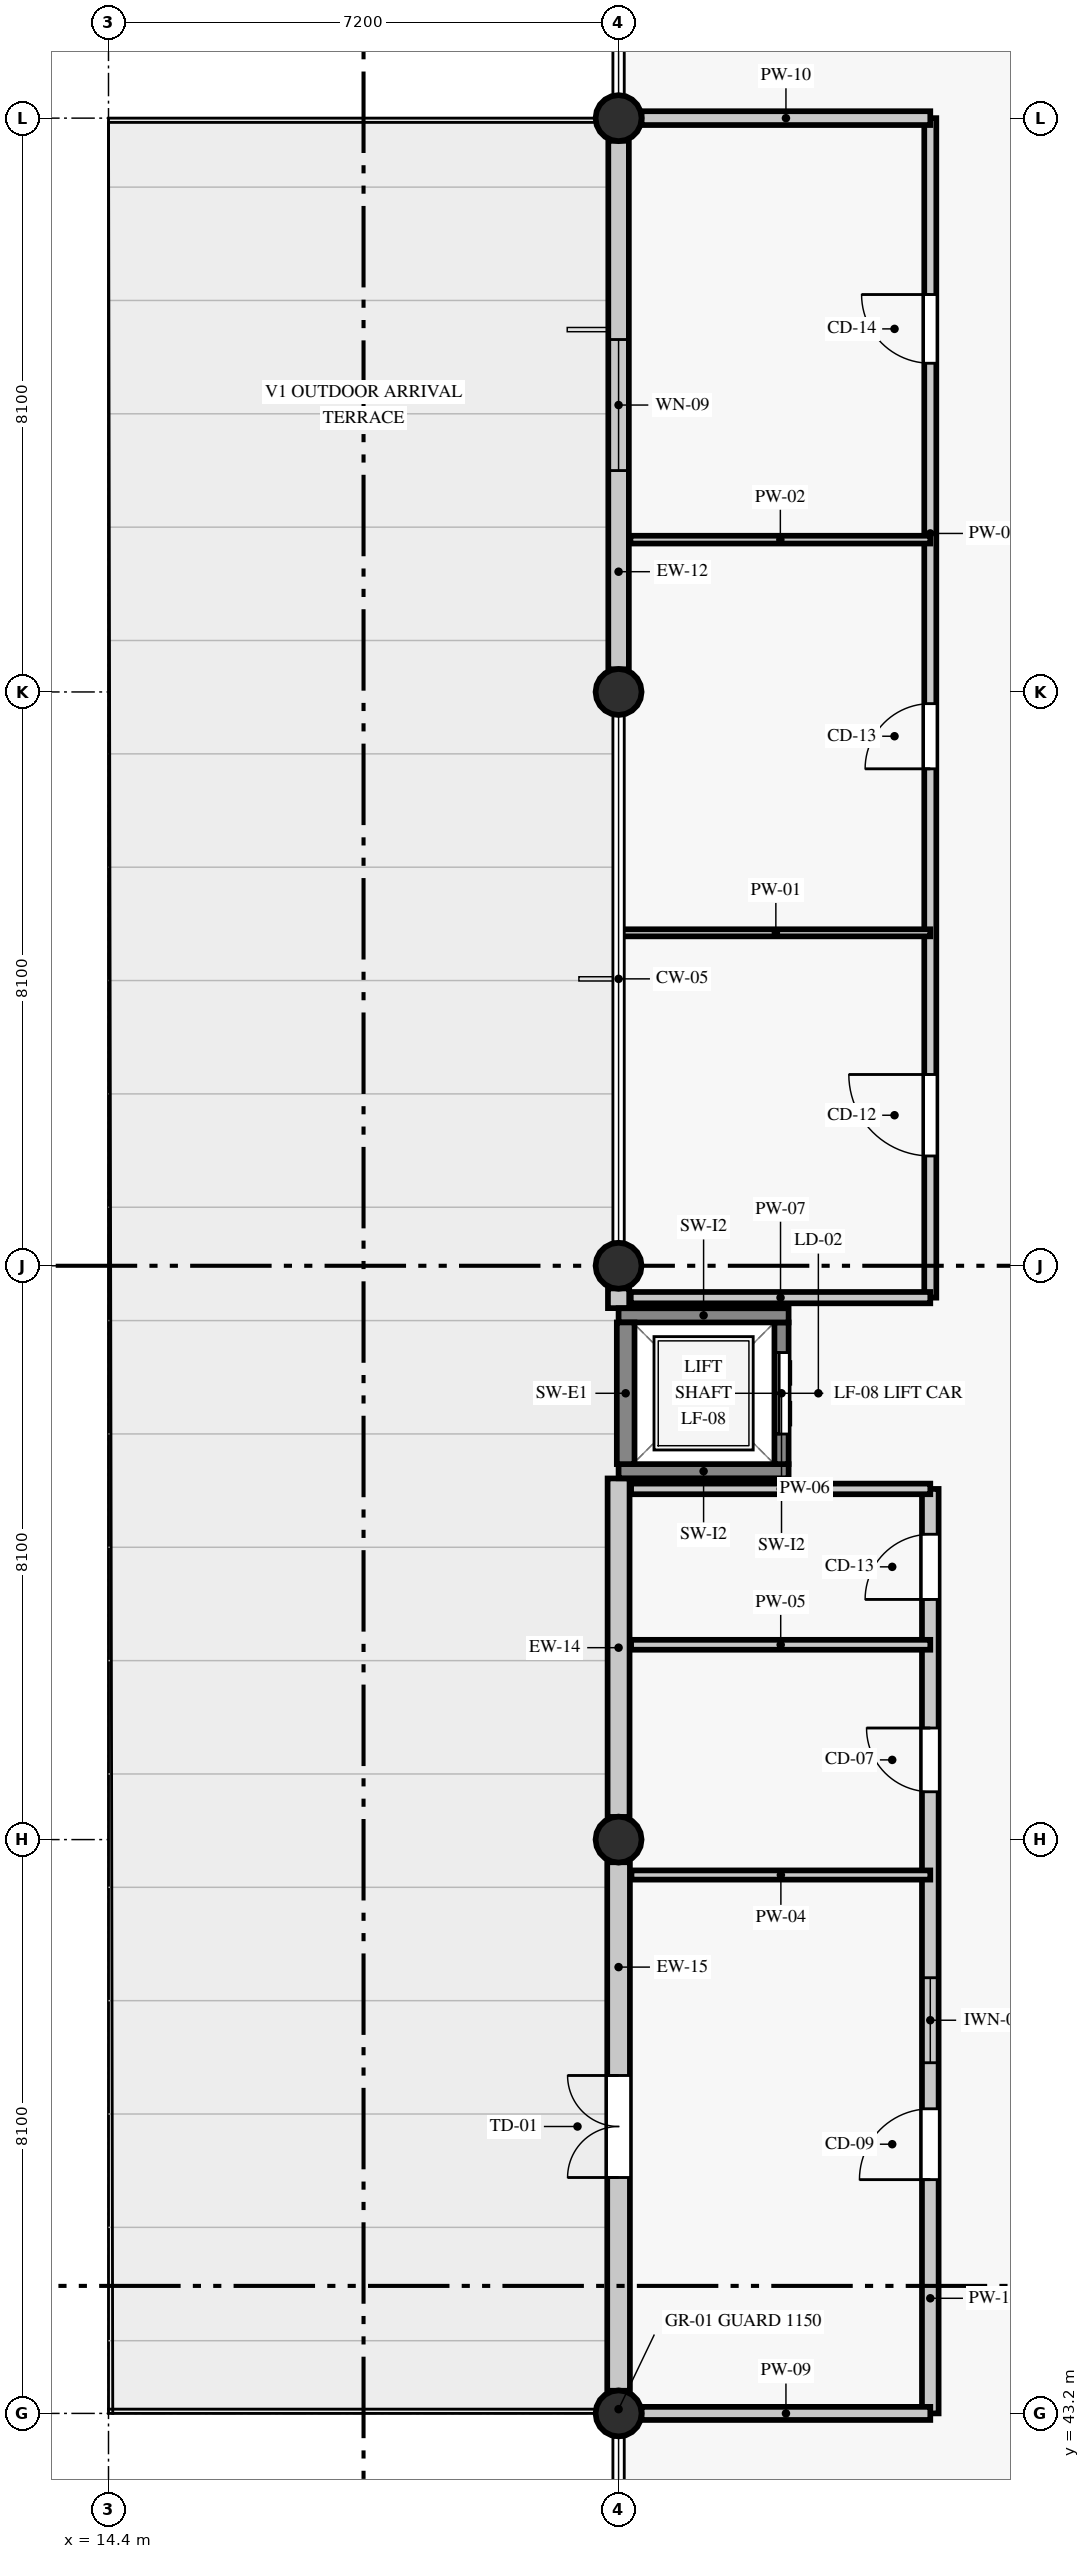
"""IFC4 building model, lengths in metres.
Left out: names, types, materials, properties, quantities, classifications, styles, units other than length and angle.
Written with IfcOpenShell. Run it as: python <this file> out.ifc"""

import sys

from ifc_helpers import new_model, si_unit, direction, frame, frame_2d, origin, origin_2d, place, context, subcontext, project, spatial, rectangle, circle, extrude, element, fill, save


model = new_model("IFC4")
c1 = context("Model", 3, precision=1e-05, world=origin(), true_north=direction((0.0, 1.0)))
c2 = subcontext(c1, "Body", "Model", "MODEL_VIEW")
j1 = project(units=[si_unit("LENGTHUNIT", "METRE"), si_unit("PLANEANGLEUNIT", "RADIAN")], contexts=[c1])
p1 = place(None, origin())
s1 = spatial("IfcSite", under=j1, at=p1, CompositionType="ELEMENT")
p2 = place(p1, origin())
s2 = spatial("IfcBuilding", under=s1, at=p2, CompositionType="ELEMENT")
p3 = place(p2, frame((0.0, 0.0, 4.8)))
s3 = spatial("IfcBuildingStorey", under=s2, at=p3, CompositionType="ELEMENT", Elevation=4.8)
for number, where, z_axis, x_axis in (
    (1, (21.6, 43.2, 0.0), (0.0, 0.0, 1.0), (1.0, 0.0, 0.0)),
    (2, (21.6, 51.3, 0.0), (0.0, 0.0, 1.0), (1.0, 0.0, 0.0)),
    (3, (21.6, 59.4, 0.0), (0.0, 0.0, 1.0), (1.0, 0.0, 0.0)),
    (4, (21.6, 67.5, 0.0), (0.0, 0.0, 1.0), (1.0, 0.0, 0.0)),
    (5, (21.6, 75.6, 0.0), (0.0, 0.0, 1.0), (1.0, 0.0, 0.0)),
):
    element("IfcColumn", number, at=place(p3, frame(where, z_axis=z_axis, x_axis=x_axis)), inside=s3, PredefinedType="COLUMN", context=c2, shape_type="SweptSolid", body=[
        extrude(circle(Radius=0.325, at=origin_2d()), origin(), (0.0, 0.0, 1.0), 4.6),
    ])
p4 = place(p3, frame((21.6, 75.28, 0.0), z_axis=(0.0, 0.0, 1.0), x_axis=(0.0, -1.0, 0.0)))
e6 = element("IfcWall", 6, at=p4, inside=s3, PredefinedType="STANDARD", context=c2, shape_type="SweptSolid", body=[
    extrude(rectangle(XDim=7.46, YDim=0.29, at=frame_2d((3.73, 0.0))), origin(), (0.0, 0.0, 1.0), 3.95),
])
p5 = place(p4, frame((2.805, 0.0, 0.9)))
e7 = element("IfcOpeningElement", 7, at=p5, cuts=e6, PredefinedType="OPENING", context=c2, shape_type="SweptSolid", body=[
    extrude(rectangle(XDim=1.85, YDim=1.3, at=frame_2d((0.925, 0.65))), frame((0.0, 0.155, 0.0), z_axis=(0.0, -1.0, 0.0), x_axis=(1.0, 0.0, 0.0)), (0.0, 0.0, 1.0), 0.31),
])
p6 = place(p3, frame((21.6, 59.08, 0.0), z_axis=(0.0, 0.0, 1.0), x_axis=(0.0, -1.0, 0.0)))
e8 = element("IfcWall", 8, at=p6, inside=s3, PredefinedType="STANDARD", context=c2, shape_type="SweptSolid", body=[
    extrude(rectangle(XDim=0.278, YDim=0.3, at=frame_2d((0.139, 0.0))), origin(), (0.0, 0.0, 1.0), 3.95),
])
p7 = place(p3, frame((21.6, 56.398, 0.0), z_axis=(0.0, 0.0, 1.0), x_axis=(0.0, -1.0, 0.0)))
e9 = element("IfcWall", 9, at=p7, inside=s3, PredefinedType="STANDARD", context=c2, shape_type="SweptSolid", body=[
    extrude(rectangle(XDim=4.778, YDim=0.31, at=frame_2d((2.389, 0.0))), origin(), (0.0, 0.0, 1.0), 3.95),
])
p8 = place(p3, frame((21.6, 50.98, 0.0), z_axis=(0.0, 0.0, 1.0), x_axis=(0.0, -1.0, 0.0)))
e10 = element("IfcWall", 10, at=p8, inside=s3, PredefinedType="STANDARD", context=c2, shape_type="SweptSolid", body=[
    extrude(rectangle(XDim=7.46, YDim=0.32, at=frame_2d((3.73, 0.0))), origin(), (0.0, 0.0, 1.0), 3.95),
])
p9 = place(p8, frame((3.01, 0.0, 0.0)))
e11 = element("IfcOpeningElement", 11, at=p9, cuts=e10, PredefinedType="OPENING", context=c2, shape_type="SweptSolid", body=[
    extrude(rectangle(XDim=1.44, YDim=2.16, at=frame_2d((0.72, 1.08))), frame((0.0, 0.17, 0.0), z_axis=(0.0, -1.0, 0.0), x_axis=(1.0, 0.0, 0.0)), (0.0, 0.0, 1.0), 0.34),
])
p10 = place(p3, frame((21.6, 56.5, 0.0), z_axis=(0.0, 0.0, 1.0), x_axis=(1.0, 0.0, 0.0)))
e12 = element("IfcWall", 12, at=p10, inside=s3, PredefinedType="SHEAR", context=c2, shape_type="SweptSolid", body=[
    extrude(rectangle(XDim=2.4, YDim=0.2, at=frame_2d((1.2, 0.0))), origin(), (0.0, 0.0, 1.0), 4.6),
])
p11 = place(p3, frame((23.9, 56.6, 0.0), z_axis=(0.0, 0.0, 1.0), x_axis=(0.0, 1.0, 0.0)))
e13 = element("IfcWall", 13, at=p11, inside=s3, PredefinedType="SHEAR", context=c2, shape_type="SweptSolid", body=[
    extrude(rectangle(XDim=2.0, YDim=0.2, at=frame_2d((1.0, 0.0))), origin(), (0.0, 0.0, 1.0), 4.6),
])
p12 = place(p11, frame((0.425, 0.0, 0.0)))
e14 = element("IfcOpeningElement", 14, at=p12, cuts=e13, PredefinedType="OPENING", context=c2, shape_type="SweptSolid", body=[
    extrude(rectangle(XDim=1.15, YDim=2.15, at=frame_2d((0.575, 1.075))), frame((0.0, 0.11, 0.0), z_axis=(0.0, -1.0, 0.0), x_axis=(1.0, 0.0, 0.0)), (0.0, 0.0, 1.0), 0.22),
])
p13 = place(p3, frame((24.0, 58.7, 0.0), z_axis=(0.0, 0.0, 1.0), x_axis=(-1.0, 0.0, 0.0)))
e15 = element("IfcWall", 15, at=p13, inside=s3, PredefinedType="SHEAR", context=c2, shape_type="SweptSolid", body=[
    extrude(rectangle(XDim=2.4, YDim=0.2, at=frame_2d((1.2, 0.0))), origin(), (0.0, 0.0, 1.0), 4.6),
])
p14 = place(p3, frame((21.7, 58.6, 0.0), z_axis=(0.0, 0.0, 1.0), x_axis=(0.0, -1.0, 0.0)))
e16 = element("IfcWall", 16, at=p14, inside=s3, PredefinedType="SHEAR", context=c2, shape_type="SweptSolid", body=[
    extrude(rectangle(XDim=2.0, YDim=0.25, at=frame_2d((1.0, 0.0))), origin(), (0.0, 0.0, 1.0), 4.6),
])
p15 = place(p3, frame((26.0, 43.2, 0.0), z_axis=(0.0, 0.0, 1.0), x_axis=(0.0, 1.0, 0.0)))
e17 = element("IfcWall", 17, at=p15, inside=s3, PredefinedType="PARTITIONING", context=c2, shape_type="SweptSolid", body=[
    extrude(rectangle(XDim=13.05, YDim=0.235, at=frame_2d((6.525, 0.0))), origin(), (0.0, 0.0, 1.0), 3.85),
])
p16 = place(p15, frame((3.3, 0.0, 0.0)))
e18 = element("IfcOpeningElement", 18, at=p16, cuts=e17, PredefinedType="OPENING", context=c2, shape_type="SweptSolid", body=[
    extrude(rectangle(XDim=1.0, YDim=2.13, at=frame_2d((0.5, 1.065))), frame((0.0, 0.127, 0.0), z_axis=(0.0, -1.0, 0.0), x_axis=(1.0, 0.0, 0.0)), (0.0, 0.0, 1.0), 0.255),
])
p17 = place(p15, frame((4.95, 0.0, 1.05)))
e19 = element("IfcOpeningElement", 19, at=p17, cuts=e17, PredefinedType="OPENING", context=c2, shape_type="SweptSolid", body=[
    extrude(rectangle(XDim=1.2, YDim=1.1, at=frame_2d((0.6, 0.55))), frame((0.0, 0.127, 0.0), z_axis=(0.0, -1.0, 0.0), x_axis=(1.0, 0.0, 0.0)), (0.0, 0.0, 1.0), 0.255),
])
p18 = place(p15, frame((8.775, 0.0, 0.0)))
e20 = element("IfcOpeningElement", 20, at=p18, cuts=e17, PredefinedType="OPENING", context=c2, shape_type="SweptSolid", body=[
    extrude(rectangle(XDim=0.9, YDim=2.13, at=frame_2d((0.45, 1.065))), frame((0.0, 0.127, 0.0), z_axis=(0.0, -1.0, 0.0), x_axis=(1.0, 0.0, 0.0)), (0.0, 0.0, 1.0), 0.255),
])
p19 = place(p15, frame((11.49, 0.0, 0.0)))
e21 = element("IfcOpeningElement", 21, at=p19, cuts=e17, PredefinedType="OPENING", context=c2, shape_type="SweptSolid", body=[
    extrude(rectangle(XDim=0.92, YDim=2.18, at=frame_2d((0.46, 1.09))), frame((0.0, 0.127, 0.0), z_axis=(0.0, -1.0, 0.0), x_axis=(1.0, 0.0, 0.0)), (0.0, 0.0, 1.0), 0.255),
])
p20 = place(p3, frame((26.0, 58.95, 0.0), z_axis=(0.0, 0.0, 1.0), x_axis=(0.0, 1.0, 0.0)))
e22 = element("IfcWall", 22, at=p20, inside=s3, PredefinedType="PARTITIONING", context=c2, shape_type="SweptSolid", body=[
    extrude(rectangle(XDim=16.65, YDim=0.17, at=frame_2d((8.325, 0.0))), origin(), (0.0, 0.0, 1.0), 3.85),
])
p21 = place(p20, frame((2.0, 0.0, 0.0)))
e23 = element("IfcOpeningElement", 23, at=p21, cuts=e22, PredefinedType="OPENING", context=c2, shape_type="SweptSolid", body=[
    extrude(rectangle(XDim=1.15, YDim=2.13, at=frame_2d((0.575, 1.065))), frame((0.0, 0.095, 0.0), z_axis=(0.0, -1.0, 0.0), x_axis=(1.0, 0.0, 0.0)), (0.0, 0.0, 1.0), 0.19),
])
p22 = place(p20, frame((7.465, 0.0, 0.0)))
e24 = element("IfcOpeningElement", 24, at=p22, cuts=e22, PredefinedType="OPENING", context=c2, shape_type="SweptSolid", body=[
    extrude(rectangle(XDim=0.92, YDim=2.18, at=frame_2d((0.46, 1.09))), frame((0.0, 0.095, 0.0), z_axis=(0.0, -1.0, 0.0), x_axis=(1.0, 0.0, 0.0)), (0.0, 0.0, 1.0), 0.19),
])
p23 = place(p20, frame((13.19, 0.0, 0.0)))
e25 = element("IfcOpeningElement", 25, at=p23, cuts=e22, PredefinedType="OPENING", context=c2, shape_type="SweptSolid", body=[
    extrude(rectangle(XDim=0.97, YDim=2.18, at=frame_2d((0.485, 1.09))), frame((0.0, 0.095, 0.0), z_axis=(0.0, -1.0, 0.0), x_axis=(1.0, 0.0, 0.0)), (0.0, 0.0, 1.0), 0.19),
])
p24 = place(p3, frame((21.925, 43.2, 0.0), z_axis=(0.0, 0.0, 1.0), x_axis=(1.0, 0.0, 0.0)))
e26 = element("IfcWall", 26, at=p24, inside=s3, PredefinedType="PARTITIONING", context=c2, shape_type="SweptSolid", body=[
    extrude(rectangle(XDim=4.075, YDim=0.185, at=frame_2d((2.038, 0.0))), origin(), (0.0, 0.0, 1.0), 3.85),
])
p25 = place(p3, frame((21.925, 75.6, 0.0), z_axis=(0.0, 0.0, 1.0), x_axis=(1.0, 0.0, 0.0)))
e27 = element("IfcWall", 27, at=p25, inside=s3, PredefinedType="PARTITIONING", context=c2, shape_type="SweptSolid", body=[
    extrude(rectangle(XDim=4.075, YDim=0.195, at=frame_2d((2.038, 0.0))), origin(), (0.0, 0.0, 1.0), 3.85),
])
p26 = place(p3, frame((21.782, 50.8, 0.0), z_axis=(0.0, 0.0, 1.0), x_axis=(1.0, 0.0, 0.0)))
e28 = element("IfcWall", 28, at=p26, inside=s3, PredefinedType="PARTITIONING", context=c2, shape_type="SweptSolid", body=[
    extrude(rectangle(XDim=4.218, YDim=0.13, at=frame_2d((2.109, 0.0))), origin(), (0.0, 0.0, 1.0), 4.6),
])
p27 = place(p3, frame((21.777, 54.05, 0.0), z_axis=(0.0, 0.0, 1.0), x_axis=(1.0, 0.0, 0.0)))
e29 = element("IfcWall", 29, at=p27, inside=s3, PredefinedType="PARTITIONING", context=c2, shape_type="SweptSolid", body=[
    extrude(rectangle(XDim=4.223, YDim=0.14, at=frame_2d((2.111, 0.0))), origin(), (0.0, 0.0, 1.0), 4.6),
])
p28 = place(p3, frame((21.777, 56.25, 0.0), z_axis=(0.0, 0.0, 1.0), x_axis=(1.0, 0.0, 0.0)))
e30 = element("IfcWall", 30, at=p28, inside=s3, PredefinedType="PARTITIONING", context=c2, shape_type="SweptSolid", body=[
    extrude(rectangle(XDim=4.223, YDim=0.15, at=frame_2d((2.111, 0.0))), origin(), (0.0, 0.0, 1.0), 4.6),
])
p29 = place(p3, frame((21.772, 58.95, 0.0), z_axis=(0.0, 0.0, 1.0), x_axis=(1.0, 0.0, 0.0)))
e31 = element("IfcWall", 31, at=p29, inside=s3, PredefinedType="PARTITIONING", context=c2, shape_type="SweptSolid", body=[
    extrude(rectangle(XDim=4.228, YDim=0.16, at=frame_2d((2.114, 0.0))), origin(), (0.0, 0.0, 1.0), 4.6),
])
p30 = place(p3, frame((21.64, 64.1, 0.0), z_axis=(0.0, 0.0, 1.0), x_axis=(1.0, 0.0, 0.0)))
e32 = element("IfcWall", 32, at=p30, inside=s3, PredefinedType="PARTITIONING", context=c2, shape_type="SweptSolid", body=[
    extrude(rectangle(XDim=4.36, YDim=0.1, at=frame_2d((2.18, 0.0))), origin(), (0.0, 0.0, 1.0), 4.6),
])
p31 = place(p3, frame((21.767, 69.65, 0.0), z_axis=(0.0, 0.0, 1.0), x_axis=(1.0, 0.0, 0.0)))
e33 = element("IfcWall", 33, at=p31, inside=s3, PredefinedType="PARTITIONING", context=c2, shape_type="SweptSolid", body=[
    extrude(rectangle(XDim=4.233, YDim=0.11, at=frame_2d((2.116, 0.0))), origin(), (0.0, 0.0, 1.0), 4.6),
])
p32 = place(p5, origin())
e34 = element("IfcWindow", 34, at=p32, inside=s3, PartitioningType="SINGLE_PANEL", PredefinedType="WINDOW", context=c2, shape_type="SweptSolid", body=[
    extrude(rectangle(XDim=1.85, YDim=1.3, at=frame_2d((0.925, 0.65))), frame((0.0, 0.03, 0.0), z_axis=(0.0, -1.0, 0.0), x_axis=(1.0, 0.0, 0.0)), (0.0, 0.0, 1.0), 0.06),
])
fill(e7, e34)
p33 = place(p9, frame((1.44, 0.0, 0.0), z_axis=(0.0, 0.0, 1.0), x_axis=(-1.0, 0.0, 0.0)))
e35 = element("IfcDoor", 35, at=p33, inside=s3, OperationType="DOUBLE_DOOR_SINGLE_SWING", PredefinedType="DOOR", context=c2, shape_type="SweptSolid", body=[
    extrude(rectangle(XDim=1.44, YDim=2.16, at=frame_2d((0.72, 1.08))), frame((0.0, 0.025, 0.0), z_axis=(0.0, -1.0, 0.0), x_axis=(1.0, 0.0, 0.0)), (0.0, 0.0, 1.0), 0.05),
])
fill(e11, e35)
p34 = place(p12, frame((1.15, 0.0, 0.0), z_axis=(0.0, 0.0, 1.0), x_axis=(-1.0, 0.0, 0.0)))
e36 = element("IfcDoor", 36, at=p34, inside=s3, OperationType="DOUBLE_DOOR_SLIDING", PredefinedType="DOOR", context=c2, shape_type="SweptSolid", body=[
    extrude(rectangle(XDim=1.15, YDim=2.15, at=frame_2d((0.575, 1.075))), frame((0.0, 0.025, 0.0), z_axis=(0.0, -1.0, 0.0), x_axis=(1.0, 0.0, 0.0)), (0.0, 0.0, 1.0), 0.05),
])
fill(e14, e36)
p35 = place(p16, origin())
e37 = element("IfcDoor", 37, at=p35, inside=s3, OperationType="SINGLE_SWING_LEFT", PredefinedType="DOOR", context=c2, shape_type="SweptSolid", body=[
    extrude(rectangle(XDim=1.0, YDim=2.13, at=frame_2d((0.5, 1.065))), frame((0.0, 0.025, 0.0), z_axis=(0.0, -1.0, 0.0), x_axis=(1.0, 0.0, 0.0)), (0.0, 0.0, 1.0), 0.05),
])
fill(e18, e37)
p36 = place(p17, origin())
e38 = element("IfcWindow", 38, at=p36, inside=s3, PartitioningType="SINGLE_PANEL", PredefinedType="WINDOW", context=c2, shape_type="SweptSolid", body=[
    extrude(rectangle(XDim=1.2, YDim=1.1, at=frame_2d((0.6, 0.55))), frame((0.0, 0.03, 0.0), z_axis=(0.0, -1.0, 0.0), x_axis=(1.0, 0.0, 0.0)), (0.0, 0.0, 1.0), 0.06),
])
fill(e19, e38)
p37 = place(p18, origin())
e39 = element("IfcDoor", 39, at=p37, inside=s3, OperationType="SINGLE_SWING_RIGHT", PredefinedType="DOOR", context=c2, shape_type="SweptSolid", body=[
    extrude(rectangle(XDim=0.9, YDim=2.13, at=frame_2d((0.45, 1.065))), frame((0.0, 0.025, 0.0), z_axis=(0.0, -1.0, 0.0), x_axis=(1.0, 0.0, 0.0)), (0.0, 0.0, 1.0), 0.05),
])
fill(e20, e39)
p38 = place(p19, origin())
e40 = element("IfcDoor", 40, at=p38, inside=s3, OperationType="SINGLE_SWING_LEFT", PredefinedType="DOOR", context=c2, shape_type="SweptSolid", body=[
    extrude(rectangle(XDim=0.92, YDim=2.18, at=frame_2d((0.46, 1.09))), frame((0.0, 0.025, 0.0), z_axis=(0.0, -1.0, 0.0), x_axis=(1.0, 0.0, 0.0)), (0.0, 0.0, 1.0), 0.05),
])
fill(e21, e40)
p39 = place(p21, origin())
e41 = element("IfcDoor", 41, at=p39, inside=s3, OperationType="SINGLE_SWING_RIGHT", PredefinedType="DOOR", context=c2, shape_type="SweptSolid", body=[
    extrude(rectangle(XDim=1.15, YDim=2.13, at=frame_2d((0.575, 1.065))), frame((0.0, 0.025, 0.0), z_axis=(0.0, -1.0, 0.0), x_axis=(1.0, 0.0, 0.0)), (0.0, 0.0, 1.0), 0.05),
])
fill(e23, e41)
p40 = place(p22, origin())
e42 = element("IfcDoor", 42, at=p40, inside=s3, OperationType="SINGLE_SWING_LEFT", PredefinedType="DOOR", context=c2, shape_type="SweptSolid", body=[
    extrude(rectangle(XDim=0.92, YDim=2.18, at=frame_2d((0.46, 1.09))), frame((0.0, 0.025, 0.0), z_axis=(0.0, -1.0, 0.0), x_axis=(1.0, 0.0, 0.0)), (0.0, 0.0, 1.0), 0.05),
])
fill(e24, e42)
p41 = place(p23, origin())
e43 = element("IfcDoor", 43, at=p41, inside=s3, OperationType="SINGLE_SWING_RIGHT", PredefinedType="DOOR", context=c2, shape_type="SweptSolid", body=[
    extrude(rectangle(XDim=0.97, YDim=2.18, at=frame_2d((0.485, 1.09))), frame((0.0, 0.025, 0.0), z_axis=(0.0, -1.0, 0.0), x_axis=(1.0, 0.0, 0.0)), (0.0, 0.0, 1.0), 0.05),
])
fill(e25, e43)
save(model, sys.argv[1])
